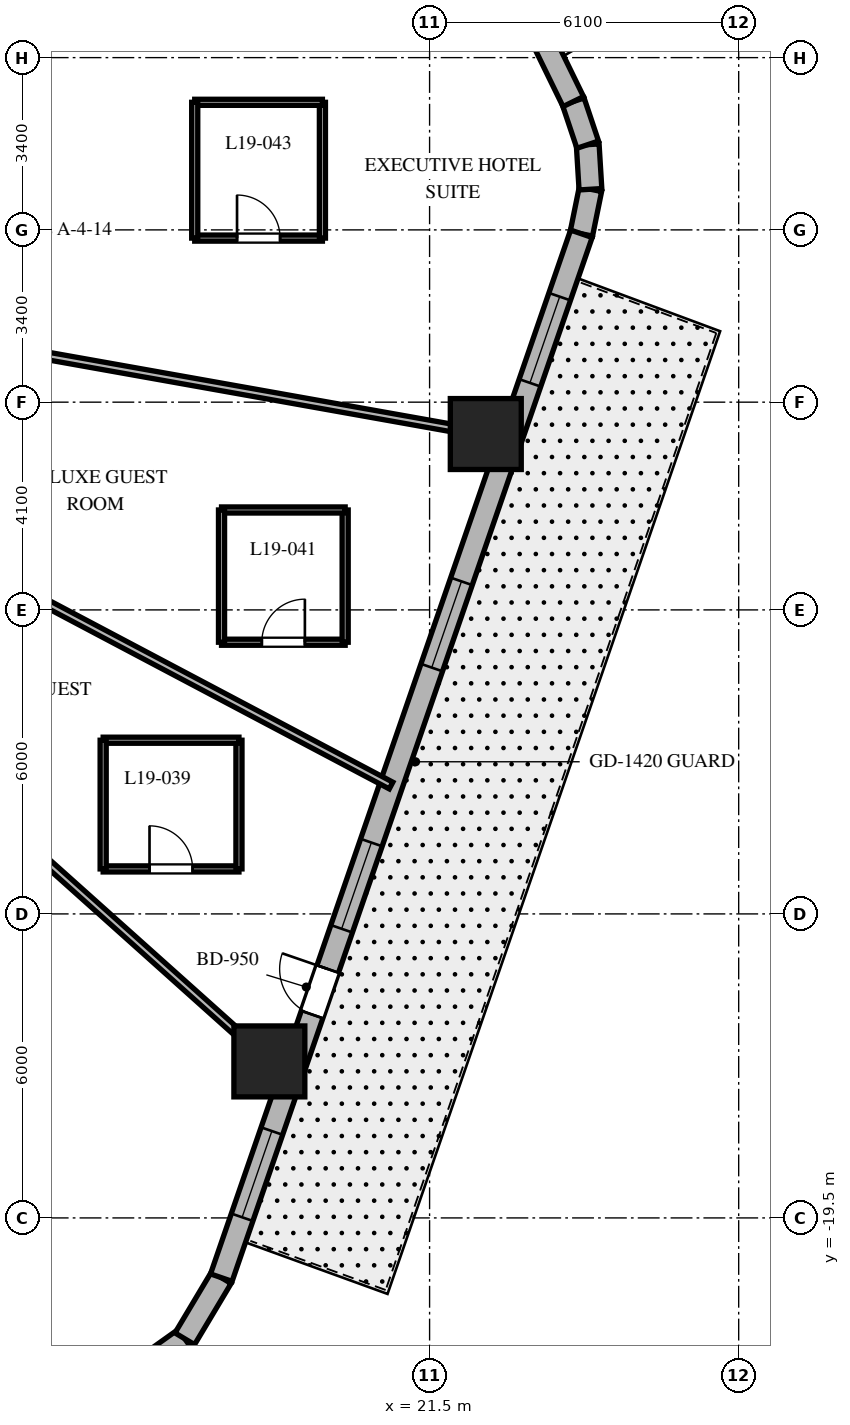
"""IFC4 building model, lengths in metres.
Left out: names, types, materials, properties, quantities, classifications, styles, units other than length and angle.
Written with IfcOpenShell. Run it as: python <this file> out.ifc"""

import sys

from ifc_helpers import new_model, si_unit, direction, frame, frame_2d, origin, origin_2d, place, context, subcontext, project, spatial, rectangle, extrude, element, fill, save


model = new_model("IFC4")
c1 = context("Model", 3, precision=1e-05, world=origin(), true_north=direction((0.0, 1.0)))
c2 = subcontext(c1, "Body", "Model", "MODEL_VIEW")
j1 = project(units=[si_unit("LENGTHUNIT", "METRE"), si_unit("PLANEANGLEUNIT", "RADIAN")], contexts=[c1])
p1 = place(None, origin())
s1 = spatial("IfcSite", under=j1, at=p1, CompositionType="ELEMENT")
p2 = place(p1, origin())
s2 = spatial("IfcBuilding", under=s1, at=p2, CompositionType="ELEMENT")
p3 = place(p2, frame((0.0, 0.0, 82.3)))
s3 = spatial("IfcBuildingStorey", under=s2, at=p3, CompositionType="ELEMENT", Elevation=82.3)
for number, where, z_axis, x_axis in (
    (1, (18.338, -16.411, 0.0), (0.0, 0.0, 1.0), (1.0, 0.0, 0.0)),
    (2, (22.609, -4.029, 0.0), (0.0, 0.0, 1.0), (1.0, 0.0, 0.0)),
):
    element("IfcColumn", number, at=place(p3, frame(where, z_axis=z_axis, x_axis=x_axis)), inside=s3, PredefinedType="COLUMN", context=c2, shape_type="SweptSolid", body=[
        extrude(rectangle(XDim=1.4, YDim=1.4, at=origin_2d()), origin(), (0.0, 0.0, 1.0), 3.7),
    ])
p4 = place(p3, frame((15.544, -22.687, 0.0), z_axis=(0.0, 0.0, 1.0), x_axis=(0.814210854316, 0.580569276412, 0.0)))
e3 = element("IfcWall", 3, at=p4, inside=s3, PredefinedType="SOLIDWALL", context=c2, shape_type="SweptSolid", body=[
    extrude(rectangle(XDim=1.381, YDim=0.45, at=frame_2d((0.691, 0.0))), origin(), (0.0, 0.0, 1.0), 3.38),
])
p5 = place(p3, frame((16.669, -21.885, 0.0), z_axis=(0.0, 0.0, 1.0), x_axis=(0.512936712947, 0.858426425799, 0.0)))
e4 = element("IfcWall", 4, at=p5, inside=s3, PredefinedType="SOLIDWALL", context=c2, shape_type="SweptSolid", body=[
    extrude(rectangle(XDim=1.406, YDim=0.45, at=frame_2d((0.703, 0.0))), origin(), (0.0, 0.0, 1.0), 3.38),
])
p6 = place(p3, frame((24.496, -0.077, 0.0), z_axis=(0.0, 0.0, 1.0), x_axis=(0.199570594521, 0.979883451132, 0.0)))
e5 = element("IfcWall", 5, at=p6, inside=s3, PredefinedType="SOLIDWALL", context=c2, shape_type="SweptSolid", body=[
    extrude(rectangle(XDim=0.897, YDim=0.45, at=frame_2d((0.448, 0.0))), origin(), (0.0, 0.0, 1.0), 3.38),
])
p7 = place(p3, frame((24.675, 0.802, 0.0), z_axis=(0.0, 0.0, 1.0), x_axis=(-0.061188874166, 0.998126205286, 0.0)))
e6 = element("IfcWall", 6, at=p7, inside=s3, PredefinedType="SOLIDWALL", context=c2, shape_type="SweptSolid", body=[
    extrude(rectangle(XDim=0.882, YDim=0.45, at=frame_2d((0.441, 0.0))), origin(), (0.0, 0.0, 1.0), 3.38),
])
p8 = place(p3, frame((24.621, 1.682, 0.0), z_axis=(0.0, 0.0, 1.0), x_axis=(-0.317697451681, 0.948192137278, 0.0)))
e7 = element("IfcWall", 7, at=p8, inside=s3, PredefinedType="SOLIDWALL", context=c2, shape_type="SweptSolid", body=[
    extrude(rectangle(XDim=0.897, YDim=0.45, at=frame_2d((0.448, 0.0))), origin(), (0.0, 0.0, 1.0), 3.38),
])
p9 = place(p3, frame((17.39, -20.678, 0.0), z_axis=(0.0, 0.0, 1.0), x_axis=(0.326068018294, 0.945346310854, 0.0)))
e8 = element("IfcWall", 8, at=p9, inside=s3, PredefinedType="SOLIDWALL", context=c2, shape_type="SweptSolid", body=[
    extrude(rectangle(XDim=21.793, YDim=0.45, at=frame_2d((10.896, 0.0))), origin(), (0.0, 0.0, 1.0), 3.38),
])
p10 = place(p9, frame((5.493, 0.0, 0.0)))
e9 = element("IfcOpeningElement", 9, at=p10, cuts=e8, PredefinedType="OPENING", context=c2, shape_type="SweptSolid", body=[
    extrude(rectangle(XDim=0.95, YDim=2.15, at=frame_2d((0.475, 1.075))), frame((0.0, 0.235, 0.0), z_axis=(0.0, -1.0, 0.0), x_axis=(1.0, 0.0, 0.0)), (0.0, 0.0, 1.0), 0.47),
])
p11 = place(p9, frame((1.26, 0.0, 0.8)))
e10 = element("IfcOpeningElement", 10, at=p11, cuts=e8, PredefinedType="OPENING", context=c2, shape_type="SweptSolid", body=[
    extrude(rectangle(XDim=1.8, YDim=1.8, at=frame_2d((0.9, 0.9))), frame((0.0, 0.235, 0.0), z_axis=(0.0, -1.0, 0.0), x_axis=(1.0, 0.0, 0.0)), (0.0, 0.0, 1.0), 0.47),
])
p12 = place(p9, frame((7.283, 0.0, 0.8)))
e11 = element("IfcOpeningElement", 11, at=p12, cuts=e8, PredefinedType="OPENING", context=c2, shape_type="SweptSolid", body=[
    extrude(rectangle(XDim=1.8, YDim=1.8, at=frame_2d((0.9, 0.9))), frame((0.0, 0.235, 0.0), z_axis=(0.0, -1.0, 0.0), x_axis=(1.0, 0.0, 0.0)), (0.0, 0.0, 1.0), 0.47),
])
p13 = place(p9, frame((12.736, 0.0, 0.8)))
e12 = element("IfcOpeningElement", 12, at=p13, cuts=e8, PredefinedType="OPENING", context=c2, shape_type="SweptSolid", body=[
    extrude(rectangle(XDim=1.8, YDim=1.8, at=frame_2d((0.9, 0.9))), frame((0.0, 0.235, 0.0), z_axis=(0.0, -1.0, 0.0), x_axis=(1.0, 0.0, 0.0)), (0.0, 0.0, 1.0), 0.47),
])
p14 = place(p9, frame((18.68, 0.0, 0.8)))
e13 = element("IfcOpeningElement", 13, at=p14, cuts=e8, PredefinedType="OPENING", context=c2, shape_type="SweptSolid", body=[
    extrude(rectangle(XDim=1.8, YDim=1.8, at=frame_2d((0.9, 0.9))), frame((0.0, 0.235, 0.0), z_axis=(0.0, -1.0, 0.0), x_axis=(1.0, 0.0, 0.0)), (0.0, 0.0, 1.0), 0.47),
])
p15 = place(p3, frame((24.336, 2.532, 0.0), z_axis=(0.0, 0.0, 1.0), x_axis=(-0.438931326393, 0.898520612291, 0.0)))
e14 = element("IfcWall", 14, at=p15, inside=s3, PredefinedType="SOLIDWALL", context=c2, shape_type="SweptSolid", body=[
    extrude(rectangle(XDim=20.623, YDim=0.45, at=frame_2d((10.312, 0.0))), origin(), (0.0, 0.0, 1.0), 3.38),
])
p16 = place(p15, frame((5.171, 0.0, 0.0)))
e15 = element("IfcOpeningElement", 15, at=p16, cuts=e14, PredefinedType="OPENING", context=c2, shape_type="SweptSolid", body=[
    extrude(rectangle(XDim=1.0, YDim=2.15, at=frame_2d((0.5, 1.075))), frame((0.0, 0.235, 0.0), z_axis=(0.0, -1.0, 0.0), x_axis=(1.0, 0.0, 0.0)), (0.0, 0.0, 1.0), 0.47),
])
p17 = place(p15, frame((6.842, 0.0, 0.8)))
e16 = element("IfcOpeningElement", 16, at=p17, cuts=e14, PredefinedType="OPENING", context=c2, shape_type="SweptSolid", body=[
    extrude(rectangle(XDim=1.8, YDim=1.8, at=frame_2d((0.9, 0.9))), frame((0.0, 0.235, 0.0), z_axis=(0.0, -1.0, 0.0), x_axis=(1.0, 0.0, 0.0)), (0.0, 0.0, 1.0), 0.47),
])
p18 = place(p15, frame((12.683, 0.0, 0.8)))
e17 = element("IfcOpeningElement", 17, at=p18, cuts=e14, PredefinedType="OPENING", context=c2, shape_type="SweptSolid", body=[
    extrude(rectangle(XDim=1.8, YDim=1.8, at=frame_2d((0.9, 0.9))), frame((0.0, 0.235, 0.0), z_axis=(0.0, -1.0, 0.0), x_axis=(1.0, 0.0, 0.0)), (0.0, 0.0, 1.0), 0.47),
])
p19 = place(p15, frame((17.66, 0.0, 0.8)))
e18 = element("IfcOpeningElement", 18, at=p19, cuts=e14, PredefinedType="OPENING", context=c2, shape_type="SweptSolid", body=[
    extrude(rectangle(XDim=1.8, YDim=1.8, at=frame_2d((0.9, 0.9))), frame((0.0, 0.235, 0.0), z_axis=(0.0, -1.0, 0.0), x_axis=(1.0, 0.0, 0.0)), (0.0, 0.0, 1.0), 0.47),
])
p20 = place(p15, frame((1.214, 0.0, 0.8)))
e19 = element("IfcOpeningElement", 19, at=p20, cuts=e14, PredefinedType="OPENING", context=c2, shape_type="SweptSolid", body=[
    extrude(rectangle(XDim=1.8, YDim=1.8, at=frame_2d((0.9, 0.9))), frame((0.0, 0.235, 0.0), z_axis=(0.0, -1.0, 0.0), x_axis=(1.0, 0.0, 0.0)), (0.0, 0.0, 1.0), 0.47),
])
p21 = place(p3, frame((11.35, 3.091, 0.0), z_axis=(0.0, 0.0, 1.0), x_axis=(0.964859685283, 0.262765651704, 0.0)))
e20 = element("IfcWall", 20, at=p21, inside=s3, PredefinedType="PARTITIONING", context=c2, shape_type="SweptSolid", body=[
    extrude(rectangle(XDim=11.629, YDim=0.15, at=frame_2d((5.814, 0.0))), origin(), (0.0, 0.0, 1.0), 2.52),
])
p22 = place(p3, frame((11.007, -9.85, 0.0), z_axis=(0.0, 0.0, 1.0), x_axis=(0.745177305978, -0.666866390407, 0.0)))
e21 = element("IfcWall", 21, at=p22, inside=s3, PredefinedType="PARTITIONING", context=c2, shape_type="SweptSolid", body=[
    extrude(rectangle(XDim=10.375, YDim=0.15, at=frame_2d((5.188, 0.0))), origin(), (0.0, 0.0, 1.0), 2.52),
])
p23 = place(p3, frame((11.35, -6.001, 0.0), z_axis=(0.0, 0.0, 1.0), x_axis=(0.884022077319, -0.467445148453, 0.0)))
e22 = element("IfcWall", 22, at=p23, inside=s3, PredefinedType="PARTITIONING", context=c2, shape_type="SweptSolid", body=[
    extrude(rectangle(XDim=10.621, YDim=0.15, at=frame_2d((5.311, 0.0))), origin(), (0.0, 0.0, 1.0), 2.52),
])
p24 = place(p3, frame((11.35, -2.023, 0.0), z_axis=(0.0, 0.0, 1.0), x_axis=(0.984493741877, -0.17541970301, 0.0)))
e23 = element("IfcWall", 23, at=p24, inside=s3, PredefinedType="PARTITIONING", context=c2, shape_type="SweptSolid", body=[
    extrude(rectangle(XDim=11.937, YDim=0.15, at=frame_2d((5.969, 0.0))), origin(), (0.0, 0.0, 1.0), 2.52),
])
p25 = place(p3, frame((15.058, -12.612, 0.0), z_axis=(0.0, 0.0, 1.0), x_axis=(1.0, 0.0, 0.0)))
e24 = element("IfcWall", 24, at=p25, inside=s3, PredefinedType="PARTITIONING", context=c2, shape_type="SweptSolid", body=[
    extrude(rectangle(XDim=2.68, YDim=0.12, at=frame_2d((1.34, 0.0))), origin(), (0.0, 0.0, 1.0), 2.952),
])
p26 = place(p25, frame((0.915, 0.0, 0.0)))
e25 = element("IfcOpeningElement", 25, at=p26, cuts=e24, PredefinedType="OPENING", context=c2, shape_type="SweptSolid", body=[
    extrude(rectangle(XDim=0.85, YDim=2.03, at=frame_2d((0.425, 1.015))), frame((0.0, 0.07, 0.0), z_axis=(0.0, -1.0, 0.0), x_axis=(1.0, 0.0, 0.0)), (0.0, 0.0, 1.0), 0.14),
])
p27 = place(p3, frame((17.738, -12.612, 0.0), z_axis=(0.0, 0.0, 1.0), x_axis=(0.0, 1.0, 0.0)))
e26 = element("IfcWall", 26, at=p27, inside=s3, PredefinedType="PARTITIONING", context=c2, shape_type="SweptSolid", body=[
    extrude(rectangle(XDim=2.54, YDim=0.12, at=frame_2d((1.27, 0.0))), origin(), (0.0, 0.0, 1.0), 3.38),
])
p28 = place(p3, frame((17.738, -10.072, 0.0), z_axis=(0.0, 0.0, 1.0), x_axis=(-1.0, 0.0, 0.0)))
e27 = element("IfcWall", 27, at=p28, inside=s3, PredefinedType="PARTITIONING", context=c2, shape_type="SweptSolid", body=[
    extrude(rectangle(XDim=2.68, YDim=0.12, at=frame_2d((1.34, 0.0))), origin(), (0.0, 0.0, 1.0), 2.952),
])
p29 = place(p3, frame((15.058, -10.072, 0.0), z_axis=(0.0, 0.0, 1.0), x_axis=(0.0, -1.0, 0.0)))
e28 = element("IfcWall", 28, at=p29, inside=s3, PredefinedType="PARTITIONING", context=c2, shape_type="SweptSolid", body=[
    extrude(rectangle(XDim=2.54, YDim=0.12, at=frame_2d((1.27, 0.0))), origin(), (0.0, 0.0, 1.0), 3.38),
])
p30 = place(p3, frame((17.394, -8.138, 0.0), z_axis=(0.0, 0.0, 1.0), x_axis=(1.0, 0.0, 0.0)))
e29 = element("IfcWall", 29, at=p30, inside=s3, PredefinedType="PARTITIONING", context=c2, shape_type="SweptSolid", body=[
    extrude(rectangle(XDim=2.44, YDim=0.12, at=frame_2d((1.22, 0.0))), origin(), (0.0, 0.0, 1.0), 3.38),
])
p31 = place(p30, frame((0.795, 0.0, 0.0)))
e30 = element("IfcOpeningElement", 30, at=p31, cuts=e29, PredefinedType="OPENING", context=c2, shape_type="SweptSolid", body=[
    extrude(rectangle(XDim=0.85, YDim=2.03, at=frame_2d((0.425, 1.015))), frame((0.0, 0.07, 0.0), z_axis=(0.0, -1.0, 0.0), x_axis=(1.0, 0.0, 0.0)), (0.0, 0.0, 1.0), 0.14),
])
p32 = place(p3, frame((19.834, -8.138, 0.0), z_axis=(0.0, 0.0, 1.0), x_axis=(0.0, 1.0, 0.0)))
e31 = element("IfcWall", 31, at=p32, inside=s3, PredefinedType="PARTITIONING", context=c2, shape_type="SweptSolid", body=[
    extrude(rectangle(XDim=2.61, YDim=0.12, at=frame_2d((1.305, 0.0))), origin(), (0.0, 0.0, 1.0), 3.38),
])
p33 = place(p3, frame((19.834, -5.528, 0.0), z_axis=(0.0, 0.0, 1.0), x_axis=(-1.0, 0.0, 0.0)))
e32 = element("IfcWall", 32, at=p33, inside=s3, PredefinedType="PARTITIONING", context=c2, shape_type="SweptSolid", body=[
    extrude(rectangle(XDim=2.44, YDim=0.12, at=frame_2d((1.22, 0.0))), origin(), (0.0, 0.0, 1.0), 2.82),
])
p34 = place(p3, frame((17.394, -5.528, 0.0), z_axis=(0.0, 0.0, 1.0), x_axis=(0.0, -1.0, 0.0)))
e33 = element("IfcWall", 33, at=p34, inside=s3, PredefinedType="PARTITIONING", context=c2, shape_type="SweptSolid", body=[
    extrude(rectangle(XDim=2.61, YDim=0.12, at=frame_2d((1.305, 0.0))), origin(), (0.0, 0.0, 1.0), 2.952),
])
p35 = place(p3, frame((16.865, -0.162, 0.0), z_axis=(0.0, 0.0, 1.0), x_axis=(1.0, 0.0, 0.0)))
e34 = element("IfcWall", 34, at=p35, inside=s3, PredefinedType="PARTITIONING", context=c2, shape_type="SweptSolid", body=[
    extrude(rectangle(XDim=2.52, YDim=0.12, at=frame_2d((1.26, 0.0))), origin(), (0.0, 0.0, 1.0), 2.82),
])
p36 = place(p35, frame((0.835, 0.0, 0.0)))
e35 = element("IfcOpeningElement", 35, at=p36, cuts=e34, PredefinedType="OPENING", context=c2, shape_type="SweptSolid", body=[
    extrude(rectangle(XDim=0.85, YDim=2.03, at=frame_2d((0.425, 1.015))), frame((0.0, 0.07, 0.0), z_axis=(0.0, -1.0, 0.0), x_axis=(1.0, 0.0, 0.0)), (0.0, 0.0, 1.0), 0.14),
])
p37 = place(p3, frame((19.385, -0.162, 0.0), z_axis=(0.0, 0.0, 1.0), x_axis=(0.0, 1.0, 0.0)))
e36 = element("IfcWall", 36, at=p37, inside=s3, PredefinedType="PARTITIONING", context=c2, shape_type="SweptSolid", body=[
    extrude(rectangle(XDim=2.68, YDim=0.12, at=frame_2d((1.34, 0.0))), origin(), (0.0, 0.0, 1.0), 3.38),
])
p38 = place(p3, frame((19.385, 2.518, 0.0), z_axis=(0.0, 0.0, 1.0), x_axis=(-1.0, 0.0, 0.0)))
e37 = element("IfcWall", 37, at=p38, inside=s3, PredefinedType="PARTITIONING", context=c2, shape_type="SweptSolid", body=[
    extrude(rectangle(XDim=2.52, YDim=0.12, at=frame_2d((1.26, 0.0))), origin(), (0.0, 0.0, 1.0), 2.82),
])
p39 = place(p3, frame((16.865, 2.518, 0.0), z_axis=(0.0, 0.0, 1.0), x_axis=(0.0, -1.0, 0.0)))
e38 = element("IfcWall", 38, at=p39, inside=s3, PredefinedType="PARTITIONING", context=c2, shape_type="SweptSolid", body=[
    extrude(rectangle(XDim=2.68, YDim=0.12, at=frame_2d((1.34, 0.0))), origin(), (0.0, 0.0, 1.0), 3.38),
])
p40 = place(p10, origin())
e39 = element("IfcDoor", 39, at=p40, inside=s3, OperationType="SINGLE_SWING_RIGHT", PredefinedType="DOOR", context=c2, shape_type="SweptSolid", body=[
    extrude(rectangle(XDim=0.95, YDim=2.15, at=frame_2d((0.475, 1.075))), frame((0.0, 0.025, 0.0), z_axis=(0.0, -1.0, 0.0), x_axis=(1.0, 0.0, 0.0)), (0.0, 0.0, 1.0), 0.05),
])
fill(e9, e39)
p41 = place(p11, origin())
e40 = element("IfcWindow", 40, at=p41, inside=s3, PartitioningType="SINGLE_PANEL", PredefinedType="WINDOW", context=c2, shape_type="SweptSolid", body=[
    extrude(rectangle(XDim=1.8, YDim=1.8, at=frame_2d((0.9, 0.9))), frame((0.0, 0.03, 0.0), z_axis=(0.0, -1.0, 0.0), x_axis=(1.0, 0.0, 0.0)), (0.0, 0.0, 1.0), 0.06),
])
fill(e10, e40)
p42 = place(p12, origin())
e41 = element("IfcWindow", 41, at=p42, inside=s3, PartitioningType="SINGLE_PANEL", PredefinedType="WINDOW", context=c2, shape_type="SweptSolid", body=[
    extrude(rectangle(XDim=1.8, YDim=1.8, at=frame_2d((0.9, 0.9))), frame((0.0, 0.03, 0.0), z_axis=(0.0, -1.0, 0.0), x_axis=(1.0, 0.0, 0.0)), (0.0, 0.0, 1.0), 0.06),
])
fill(e11, e41)
p43 = place(p13, origin())
e42 = element("IfcWindow", 42, at=p43, inside=s3, PartitioningType="SINGLE_PANEL", PredefinedType="WINDOW", context=c2, shape_type="SweptSolid", body=[
    extrude(rectangle(XDim=1.8, YDim=1.8, at=frame_2d((0.9, 0.9))), frame((0.0, 0.03, 0.0), z_axis=(0.0, -1.0, 0.0), x_axis=(1.0, 0.0, 0.0)), (0.0, 0.0, 1.0), 0.06),
])
fill(e12, e42)
p44 = place(p14, origin())
e43 = element("IfcWindow", 43, at=p44, inside=s3, PartitioningType="SINGLE_PANEL", PredefinedType="WINDOW", context=c2, shape_type="SweptSolid", body=[
    extrude(rectangle(XDim=1.8, YDim=1.8, at=frame_2d((0.9, 0.9))), frame((0.0, 0.03, 0.0), z_axis=(0.0, -1.0, 0.0), x_axis=(1.0, 0.0, 0.0)), (0.0, 0.0, 1.0), 0.06),
])
fill(e13, e43)
p45 = place(p26, origin())
e44 = element("IfcDoor", 44, at=p45, inside=s3, OperationType="SINGLE_SWING_LEFT", PredefinedType="DOOR", context=c2, shape_type="SweptSolid", body=[
    extrude(rectangle(XDim=0.85, YDim=2.03, at=frame_2d((0.425, 1.015))), frame((0.0, 0.025, 0.0), z_axis=(0.0, -1.0, 0.0), x_axis=(1.0, 0.0, 0.0)), (0.0, 0.0, 1.0), 0.05),
])
fill(e25, e44)
p46 = place(p31, origin())
e45 = element("IfcDoor", 45, at=p46, inside=s3, OperationType="SINGLE_SWING_RIGHT", PredefinedType="DOOR", context=c2, shape_type="SweptSolid", body=[
    extrude(rectangle(XDim=0.85, YDim=2.03, at=frame_2d((0.425, 1.015))), frame((0.0, 0.025, 0.0), z_axis=(0.0, -1.0, 0.0), x_axis=(1.0, 0.0, 0.0)), (0.0, 0.0, 1.0), 0.05),
])
fill(e30, e45)
p47 = place(p36, origin())
e46 = element("IfcDoor", 46, at=p47, inside=s3, OperationType="SINGLE_SWING_LEFT", PredefinedType="DOOR", context=c2, shape_type="SweptSolid", body=[
    extrude(rectangle(XDim=0.85, YDim=2.03, at=frame_2d((0.425, 1.015))), frame((0.0, 0.025, 0.0), z_axis=(0.0, -1.0, 0.0), x_axis=(1.0, 0.0, 0.0)), (0.0, 0.0, 1.0), 0.05),
])
fill(e35, e46)
save(model, sys.argv[1])
